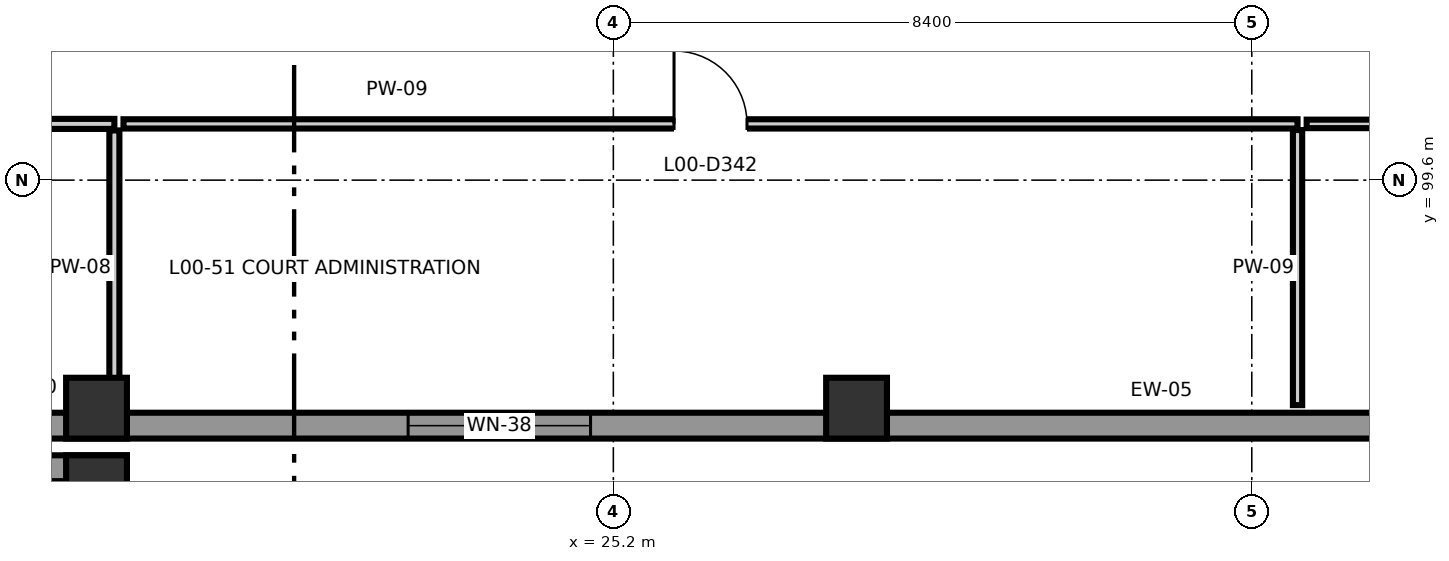
"""IFC4 building model, lengths in metres.
Left out: names, types, materials, properties, quantities, classifications, styles, units other than length and angle.
Written with IfcOpenShell. Run it as: python <this file> out.ifc"""

import sys

from ifc_helpers import new_model, si_unit, direction, frame, frame_2d, origin, origin_2d, place, context, subcontext, project, spatial, rectangle, extrude, element, fill, save


model = new_model("IFC4")
c1 = context("Model", 3, precision=1e-05, world=origin(), true_north=direction((0.0, 1.0)))
c2 = subcontext(c1, "Body", "Model", "MODEL_VIEW")
j1 = project(units=[si_unit("LENGTHUNIT", "METRE"), si_unit("PLANEANGLEUNIT", "RADIAN")], contexts=[c1])
p1 = place(None, origin())
s1 = spatial("IfcSite", under=j1, at=p1, CompositionType="ELEMENT")
p2 = place(p1, origin())
s2 = spatial("IfcBuilding", under=s1, at=p2, CompositionType="ELEMENT")
p3 = place(p2, origin())
s3 = spatial("IfcBuildingStorey", under=s2, at=p3, CompositionType="ELEMENT", Elevation=0.0)
for number, where, z_axis, x_axis in (
    (1, (18.4, 95.58, 0.0), (0.0, 0.0, 1.0), (1.0, 0.0, 0.0)),
    (2, (18.4, 96.6, 0.0), (0.0, 0.0, 1.0), (1.0, 0.0, 0.0)),
    (3, (28.4, 96.6, 0.0), (0.0, 0.0, 1.0), (1.0, 0.0, 0.0)),
):
    element("IfcColumn", number, at=place(p3, frame(where, z_axis=z_axis, x_axis=x_axis)), inside=s3, PredefinedType="COLUMN", context=c2, shape_type="SweptSolid", body=[
        extrude(rectangle(XDim=0.8, YDim=0.8, at=origin_2d()), origin(), (0.0, 0.0, 1.0), 5.4),
    ])
p4 = place(p3, frame((18.63, 41.355, 0.0), z_axis=(0.0, 0.0, 1.0), x_axis=(0.0, 1.0, 0.0)))
e4 = element("IfcWall", 4, at=p4, inside=s3, PredefinedType="SOLIDWALL", context=c2, shape_type="SweptSolid", body=[
    extrude(rectangle(XDim=54.29, YDim=0.34, at=frame_2d((27.145, 0.0))), origin(), (0.0, 0.0, 1.0), 5.1),
])
p5 = place(p4, frame((1.175, 0.0, 0.72)))
e5 = element("IfcOpeningElement", 5, at=p5, cuts=e4, PredefinedType="OPENING", context=c2, shape_type="SweptSolid", body=[
    extrude(rectangle(XDim=1.85, YDim=2.15, at=frame_2d((0.925, 1.075))), frame((0.0, 0.185, 0.0), z_axis=(0.0, -1.0, 0.0), x_axis=(1.0, 0.0, 0.0)), (0.0, 0.0, 1.0), 0.37),
])
p6 = place(p4, frame((34.6, 0.0, 0.72)))
e6 = element("IfcOpeningElement", 6, at=p6, cuts=e4, PredefinedType="OPENING", context=c2, shape_type="SweptSolid", body=[
    extrude(rectangle(XDim=2.2, YDim=2.35, at=frame_2d((1.1, 1.175))), frame((0.0, 0.185, 0.0), z_axis=(0.0, -1.0, 0.0), x_axis=(1.0, 0.0, 0.0)), (0.0, 0.0, 1.0), 0.37),
])
p7 = place(p3, frame((18.8, 95.81, 0.0), z_axis=(0.0, 0.0, 1.0), x_axis=(-1.0, 0.0, 0.0)))
e7 = element("IfcWall", 7, at=p7, inside=s3, PredefinedType="SOLIDWALL", context=c2, shape_type="SweptSolid", body=[
    extrude(rectangle(XDim=1.4, YDim=0.34, at=frame_2d((0.7, 0.0))), origin(), (0.0, 0.0, 1.0), 5.1),
])
p8 = place(p3, frame((17.4, 96.37, 0.0), z_axis=(0.0, 0.0, 1.0), x_axis=(1.0, 0.0, 0.0)))
e8 = element("IfcWall", 8, at=p8, inside=s3, PredefinedType="SOLIDWALL", context=c2, shape_type="SweptSolid", body=[
    extrude(rectangle(XDim=49.4, YDim=0.34, at=frame_2d((24.7, 0.0))), origin(), (0.0, 0.0, 1.0), 5.1),
])
p9 = place(p8, frame((5.1, 0.0, 0.72)))
e9 = element("IfcOpeningElement", 9, at=p9, cuts=e8, PredefinedType="OPENING", context=c2, shape_type="SweptSolid", body=[
    extrude(rectangle(XDim=2.4, YDim=2.35, at=frame_2d((1.2, 1.175))), frame((0.0, 0.185, 0.0), z_axis=(0.0, -1.0, 0.0), x_axis=(1.0, 0.0, 0.0)), (0.0, 0.0, 1.0), 0.37),
])
p10 = place(p8, frame((22.525, 0.0, 0.72)))
e10 = element("IfcOpeningElement", 10, at=p10, cuts=e8, PredefinedType="OPENING", context=c2, shape_type="SweptSolid", body=[
    extrude(rectangle(XDim=1.15, YDim=1.75, at=frame_2d((0.575, 0.875))), frame((0.0, 0.185, 0.0), z_axis=(0.0, -1.0, 0.0), x_axis=(1.0, 0.0, 0.0)), (0.0, 0.0, 1.0), 0.37),
])
p11 = place(p8, frame((30.875, 0.0, 0.72)))
e11 = element("IfcOpeningElement", 11, at=p11, cuts=e8, PredefinedType="OPENING", context=c2, shape_type="SweptSolid", body=[
    extrude(rectangle(XDim=1.25, YDim=2.15, at=frame_2d((0.625, 1.075))), frame((0.0, 0.185, 0.0), z_axis=(0.0, -1.0, 0.0), x_axis=(1.0, 0.0, 0.0)), (0.0, 0.0, 1.0), 0.37),
])
p12 = place(p8, frame((43.4, 0.0, 0.72)))
e12 = element("IfcOpeningElement", 12, at=p12, cuts=e8, PredefinedType="OPENING", context=c2, shape_type="SweptSolid", body=[
    extrude(rectangle(XDim=1.4, YDim=2.15, at=frame_2d((0.7, 1.075))), frame((0.0, 0.185, 0.0), z_axis=(0.0, -1.0, 0.0), x_axis=(1.0, 0.0, 0.0)), (0.0, 0.0, 1.0), 0.37),
])
p13 = place(p3, frame((2.38, 100.34, 0.0), z_axis=(0.0, 0.0, 1.0), x_axis=(1.0, 0.0, 0.0)))
e13 = element("IfcWall", 13, at=p13, inside=s3, PredefinedType="PARTITIONING", context=c2, shape_type="SweptSolid", body=[
    extrude(rectangle(XDim=16.255, YDim=0.132, at=frame_2d((8.127, 0.0))), origin(), (0.0, 0.0, 1.0), 4.43),
])
p14 = place(p13, frame((7.637, 0.0, 0.0)))
e14 = element("IfcOpeningElement", 14, at=p14, cuts=e13, PredefinedType="OPENING", context=c2, shape_type="SweptSolid", body=[
    extrude(rectangle(XDim=0.98, YDim=2.09, at=frame_2d((0.49, 1.045))), frame((0.0, 0.081, 0.0), z_axis=(0.0, -1.0, 0.0), x_axis=(1.0, 0.0, 0.0)), (0.0, 0.0, 1.0), 0.162),
])
p15 = place(p3, frame((18.635, 96.64, 0.0), z_axis=(0.0, 0.0, 1.0), x_axis=(0.0, 1.0, 0.0)))
e15 = element("IfcWall", 15, at=p15, inside=s3, PredefinedType="PARTITIONING", context=c2, shape_type="SweptSolid", body=[
    extrude(rectangle(XDim=3.614, YDim=0.132, at=frame_2d((1.807, 0.0))), origin(), (0.0, 0.0, 1.0), 4.58),
])
p16 = place(p3, frame((18.755, 100.34, 0.0), z_axis=(0.0, 0.0, 1.0), x_axis=(1.0, 0.0, 0.0)))
e16 = element("IfcWall", 16, at=p16, inside=s3, PredefinedType="PARTITIONING", context=c2, shape_type="SweptSolid", body=[
    extrude(rectangle(XDim=15.447, YDim=0.122, at=frame_2d((7.724, 0.0))), origin(), (0.0, 0.0, 1.0), 4.78),
])
p17 = place(p16, frame((7.243, 0.0, 0.0)))
e17 = element("IfcOpeningElement", 17, at=p17, cuts=e16, PredefinedType="OPENING", context=c2, shape_type="SweptSolid", body=[
    extrude(rectangle(XDim=0.96, YDim=2.08, at=frame_2d((0.48, 1.04))), frame((0.0, 0.076, 0.0), z_axis=(0.0, -1.0, 0.0), x_axis=(1.0, 0.0, 0.0)), (0.0, 0.0, 1.0), 0.152),
])
p18 = place(p3, frame((34.202, 96.64, 0.0), z_axis=(0.0, 0.0, 1.0), x_axis=(0.0, 1.0, 0.0)))
e18 = element("IfcWall", 18, at=p18, inside=s3, PredefinedType="PARTITIONING", context=c2, shape_type="SweptSolid", body=[
    extrude(rectangle(XDim=3.619, YDim=0.122, at=frame_2d((1.81, 0.0))), origin(), (0.0, 0.0, 1.0), 5.1),
])
p19 = place(p3, frame((34.322, 100.34, 0.0), z_axis=(0.0, 0.0, 1.0), x_axis=(1.0, 0.0, 0.0)))
e19 = element("IfcWall", 19, at=p19, inside=s3, PredefinedType="PARTITIONING", context=c2, shape_type="SweptSolid", body=[
    extrude(rectangle(XDim=16.273, YDim=0.112, at=frame_2d((8.136, 0.0))), origin(), (0.0, 0.0, 1.0), 4.43),
])
p20 = place(p19, frame((7.497, 0.0, 0.0)))
e20 = element("IfcOpeningElement", 20, at=p20, cuts=e19, PredefinedType="OPENING", context=c2, shape_type="SweptSolid", body=[
    extrude(rectangle(XDim=1.28, YDim=2.18, at=frame_2d((0.64, 1.09))), frame((0.0, 0.071, 0.0), z_axis=(0.0, -1.0, 0.0), x_axis=(1.0, 0.0, 0.0)), (0.0, 0.0, 1.0), 0.142),
])
p21 = place(p9, origin())
e21 = element("IfcWindow", 21, at=p21, inside=s3, PartitioningType="SINGLE_PANEL", PredefinedType="WINDOW", context=c2, shape_type="SweptSolid", body=[
    extrude(rectangle(XDim=2.4, YDim=2.35, at=frame_2d((1.2, 1.175))), frame((0.0, 0.03, 0.0), z_axis=(0.0, -1.0, 0.0), x_axis=(1.0, 0.0, 0.0)), (0.0, 0.0, 1.0), 0.06),
])
fill(e9, e21)
p22 = place(p17, frame((0.96, 0.0, 0.0), z_axis=(0.0, 0.0, 1.0), x_axis=(-1.0, 0.0, 0.0)))
e22 = element("IfcDoor", 22, at=p22, inside=s3, OperationType="SINGLE_SWING_LEFT", PredefinedType="DOOR", context=c2, shape_type="SweptSolid", body=[
    extrude(rectangle(XDim=0.96, YDim=2.08, at=frame_2d((0.48, 1.04))), frame((0.0, 0.025, 0.0), z_axis=(0.0, -1.0, 0.0), x_axis=(1.0, 0.0, 0.0)), (0.0, 0.0, 1.0), 0.05),
])
fill(e17, e22)
save(model, sys.argv[1])
